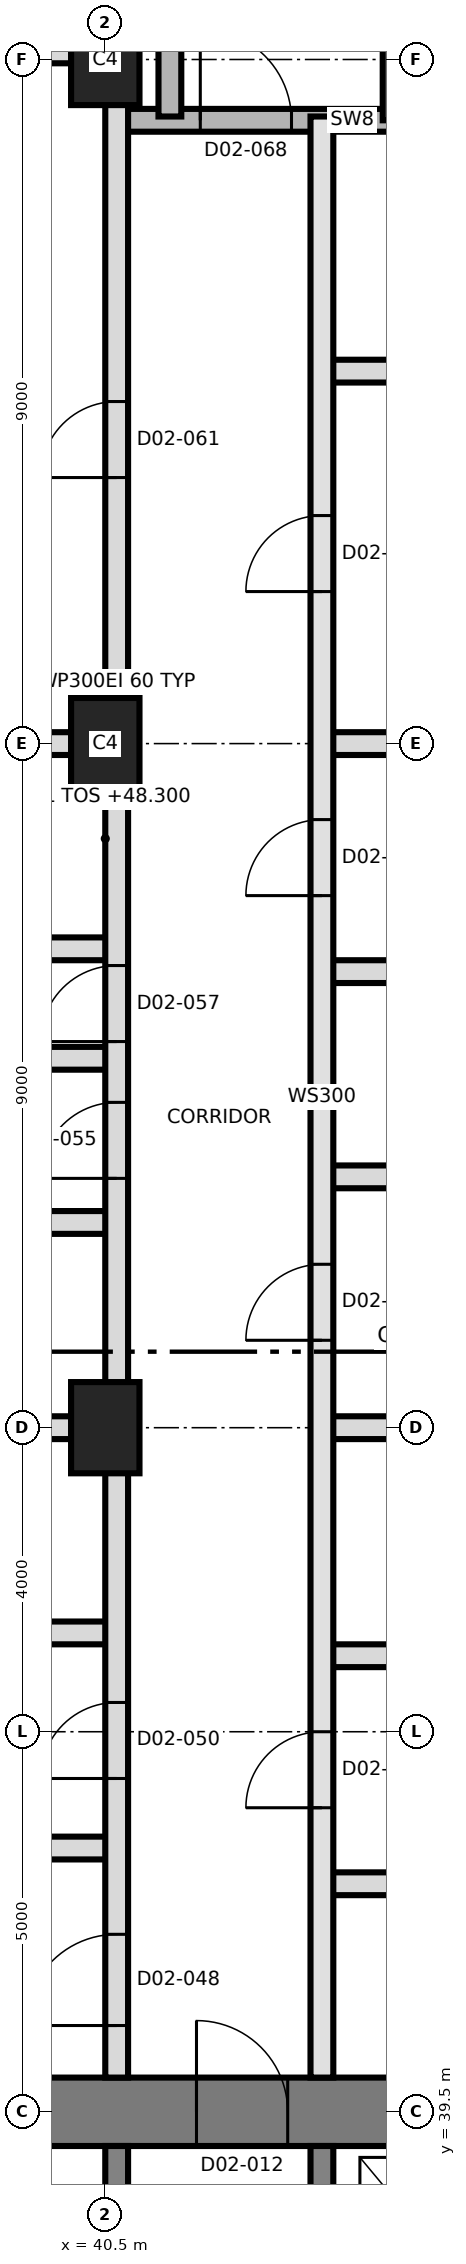
"""IFC4 building model, lengths in metres.
Left out: names, types, materials, properties, quantities, classifications, styles, units other than length and angle.
Written with IfcOpenShell. Run it as: python <this file> out.ifc"""

import sys

from ifc_helpers import new_model, si_unit, direction, frame, frame_2d, origin, origin_2d, place, context, subcontext, project, spatial, rectangle, extrude, element, fill, save


model = new_model("IFC4")
c1 = context("Model", 3, precision=1e-05, world=origin(), true_north=direction((0.0, 1.0)))
c2 = subcontext(c1, "Body", "Model", "MODEL_VIEW")
j1 = project(units=[si_unit("LENGTHUNIT", "METRE"), si_unit("PLANEANGLEUNIT", "RADIAN")], contexts=[c1])
p1 = place(None, origin())
s1 = spatial("IfcSite", under=j1, at=p1, CompositionType="ELEMENT")
p2 = place(p1, origin())
s2 = spatial("IfcBuilding", under=s1, at=p2, CompositionType="ELEMENT")
p3 = place(p2, frame((0.0, 0.0, 48.3)))
s3 = spatial("IfcBuildingStorey", under=s2, at=p3, CompositionType="ELEMENT", Elevation=48.3)
p4 = place(p3, frame((31.05, 39.5, 0.0), z_axis=(0.0, 0.0, 1.0), x_axis=(1.0, 0.0, 0.0)))
e1 = element("IfcWall", 1, at=p4, inside=s3, PredefinedType="SHEAR", context=c2, shape_type="SweptSolid", body=[
    extrude(rectangle(XDim=27.0, YDim=0.9, at=frame_2d((13.5, 0.0))), origin(), (0.0, 0.0, 1.0), 3.7),
])
p5 = place(p4, frame((10.65, 0.0, 0.0)))
e2 = element("IfcOpeningElement", 2, at=p5, cuts=e1, PredefinedType="OPENING", context=c2, shape_type="SweptSolid", body=[
    extrude(rectangle(XDim=1.2, YDim=2.1, at=frame_2d((0.6, 1.05))), frame((0.0, 0.46, 0.0), z_axis=(0.0, -1.0, 0.0), x_axis=(1.0, 0.0, 0.0)), (0.0, 0.0, 1.0), 0.92),
])
for number, where, z_axis, x_axis in (
    (3, (40.65, 33.5, 0.0), (0.0, 0.0, 1.0), (0.0, 1.0, 0.0)),
    (4, (43.35, 33.5, 0.0), (0.0, 0.0, 1.0), (0.0, 1.0, 0.0)),
):
    element("IfcWall", number, at=place(p3, frame(where, z_axis=z_axis, x_axis=x_axis)), inside=s3, PredefinedType="SHEAR", context=c2, shape_type="SweptSolid", body=[
        extrude(rectangle(XDim=5.55, YDim=0.3, at=frame_2d((2.775, 0.0))), origin(), (0.0, 0.0, 1.0), 3.7),
    ])
for number, where, z_axis, x_axis in (
    (5, (40.5, 48.5, 0.0), (0.0, 0.0, 1.0), (0.0, 1.0, 0.0)),
    (6, (40.5, 57.5, 0.0), (0.0, 0.0, 1.0), (0.0, 1.0, 0.0)),
    (7, (40.5, 66.5, 0.0), (0.0, 0.0, 1.0), (0.0, 1.0, 0.0)),
):
    element("IfcColumn", number, at=place(p3, frame(where, z_axis=z_axis, x_axis=x_axis)), inside=s3, PredefinedType="COLUMN", context=c2, shape_type="SweptSolid", body=[
        extrude(rectangle(XDim=1.2, YDim=0.9, at=origin_2d()), origin(), (0.0, 0.0, 1.0), 3.7),
    ])
p6 = place(p3, frame((43.35, 42.5, 0.0), z_axis=(0.0, 0.0, 1.0), x_axis=(1.0, 0.0, 0.0)))
e8 = element("IfcWall", 8, at=p6, inside=s3, PredefinedType="PARTITIONING", context=c2, shape_type="SweptSolid", body=[
    extrude(rectangle(XDim=3.3, YDim=0.3, at=frame_2d((1.65, 0.0))), origin(), (0.0, 0.0, 1.0), 3.4),
])
p7 = place(p3, frame((30.565, 42.97, 0.0), z_axis=(0.0, 0.0, 1.0), x_axis=(1.0, 0.0, 0.0)))
e9 = element("IfcWall", 9, at=p7, inside=s3, PredefinedType="PARTITIONING", context=c2, shape_type="SweptSolid", body=[
    extrude(rectangle(XDim=10.085, YDim=0.3, at=frame_2d((5.042, 0.0))), origin(), (0.0, 0.0, 1.0), 3.4),
])
p8 = place(p3, frame((43.35, 45.5, 0.0), z_axis=(0.0, 0.0, 1.0), x_axis=(1.0, 0.0, 0.0)))
e10 = element("IfcWall", 10, at=p8, inside=s3, PredefinedType="PARTITIONING", context=c2, shape_type="SweptSolid", body=[
    extrude(rectangle(XDim=3.3, YDim=0.3, at=frame_2d((1.65, 0.0))), origin(), (0.0, 0.0, 1.0), 3.4),
])
p9 = place(p3, frame((37.45, 45.8, 0.0), z_axis=(0.0, 0.0, 1.0), x_axis=(1.0, 0.0, 0.0)))
e11 = element("IfcWall", 11, at=p9, inside=s3, PredefinedType="PARTITIONING", context=c2, shape_type="SweptSolid", body=[
    extrude(rectangle(XDim=3.2, YDim=0.3, at=frame_2d((1.6, 0.0))), origin(), (0.0, 0.0, 1.0), 3.4),
])
p10 = place(p3, frame((30.565, 48.5, 0.0), z_axis=(0.0, 0.0, 1.0), x_axis=(1.0, 0.0, 0.0)))
e12 = element("IfcWall", 12, at=p10, inside=s3, PredefinedType="PARTITIONING", context=c2, shape_type="SweptSolid", body=[
    extrude(rectangle(XDim=10.085, YDim=0.3, at=frame_2d((5.042, 0.0))), origin(), (0.0, 0.0, 1.0), 3.4),
])
p11 = place(p3, frame((43.35, 48.5, 0.0), z_axis=(0.0, 0.0, 1.0), x_axis=(1.0, 0.0, 0.0)))
e13 = element("IfcWall", 13, at=p11, inside=s3, PredefinedType="PARTITIONING", context=c2, shape_type="SweptSolid", body=[
    extrude(rectangle(XDim=7.265, YDim=0.3, at=frame_2d((3.632, 0.0))), origin(), (0.0, 0.0, 1.0), 3.4),
])
for number, where, z_axis, x_axis in (
    (14, (37.45, 51.2, 0.0), (0.0, 0.0, 1.0), (1.0, 0.0, 0.0)),
    (15, (43.35, 51.8, 0.0), (0.0, 0.0, 1.0), (1.0, 0.0, 0.0)),
):
    element("IfcWall", number, at=place(p3, frame(where, z_axis=z_axis, x_axis=x_axis)), inside=s3, PredefinedType="PARTITIONING", context=c2, shape_type="SweptSolid", body=[
        extrude(rectangle(XDim=3.2, YDim=0.3, at=frame_2d((1.6, 0.0))), origin(), (0.0, 0.0, 1.0), 3.4),
    ])
p12 = place(p3, frame((30.565, 53.36, 0.0), z_axis=(0.0, 0.0, 1.0), x_axis=(1.0, 0.0, 0.0)))
e16 = element("IfcWall", 16, at=p12, inside=s3, PredefinedType="PARTITIONING", context=c2, shape_type="SweptSolid", body=[
    extrude(rectangle(XDim=10.085, YDim=0.3, at=frame_2d((5.042, 0.0))), origin(), (0.0, 0.0, 1.0), 3.4),
])
p13 = place(p3, frame((43.35, 54.5, 0.0), z_axis=(0.0, 0.0, 1.0), x_axis=(1.0, 0.0, 0.0)))
e17 = element("IfcWall", 17, at=p13, inside=s3, PredefinedType="PARTITIONING", context=c2, shape_type="SweptSolid", body=[
    extrude(rectangle(XDim=7.265, YDim=0.3, at=frame_2d((3.632, 0.0))), origin(), (0.0, 0.0, 1.0), 3.4),
])
p14 = place(p3, frame((37.45, 54.8, 0.0), z_axis=(0.0, 0.0, 1.0), x_axis=(1.0, 0.0, 0.0)))
e18 = element("IfcWall", 18, at=p14, inside=s3, PredefinedType="PARTITIONING", context=c2, shape_type="SweptSolid", body=[
    extrude(rectangle(XDim=3.2, YDim=0.3, at=frame_2d((1.6, 0.0))), origin(), (0.0, 0.0, 1.0), 3.4),
])
p15 = place(p3, frame((30.565, 57.5, 0.0), z_axis=(0.0, 0.0, 1.0), x_axis=(1.0, 0.0, 0.0)))
e19 = element("IfcWall", 19, at=p15, inside=s3, PredefinedType="PARTITIONING", context=c2, shape_type="SweptSolid", body=[
    extrude(rectangle(XDim=10.085, YDim=0.3, at=frame_2d((5.042, 0.0))), origin(), (0.0, 0.0, 1.0), 3.4),
])
p16 = place(p3, frame((43.35, 57.5, 0.0), z_axis=(0.0, 0.0, 1.0), x_axis=(1.0, 0.0, 0.0)))
e20 = element("IfcWall", 20, at=p16, inside=s3, PredefinedType="PARTITIONING", context=c2, shape_type="SweptSolid", body=[
    extrude(rectangle(XDim=7.265, YDim=0.3, at=frame_2d((3.632, 0.0))), origin(), (0.0, 0.0, 1.0), 3.4),
])
p17 = place(p3, frame((43.35, 62.4, 0.0), z_axis=(0.0, 0.0, 1.0), x_axis=(1.0, 0.0, 0.0)))
e21 = element("IfcWall", 21, at=p17, inside=s3, PredefinedType="PARTITIONING", context=c2, shape_type="SweptSolid", body=[
    extrude(rectangle(XDim=7.265, YDim=0.3, at=frame_2d((3.632, 0.0))), origin(), (0.0, 0.0, 1.0), 3.4),
])
p18 = place(p17, frame((4.65, 0.0, 0.0)))
e22 = element("IfcOpeningElement", 22, at=p18, cuts=e21, PredefinedType="OPENING", context=c2, shape_type="SweptSolid", body=[
    extrude(rectangle(XDim=1.0, YDim=2.1, at=frame_2d((0.5, 1.05))), frame((0.0, 0.16, 0.0), z_axis=(0.0, -1.0, 0.0), x_axis=(1.0, 0.0, 0.0)), (0.0, 0.0, 1.0), 0.32),
])
p19 = place(p3, frame((40.65, 65.7, 0.0), z_axis=(0.0, 0.0, 1.0), x_axis=(1.0, 0.0, 0.0)))
e23 = element("IfcWall", 23, at=p19, inside=s3, PredefinedType="SHEAR", context=c2, shape_type="SweptSolid", body=[
    extrude(rectangle(XDim=6.2, YDim=0.3, at=frame_2d((3.1, 0.0))), origin(), (0.0, 0.0, 1.0), 3.4),
])
p20 = place(p19, frame((1.1, 0.0, 0.0)))
e24 = element("IfcOpeningElement", 24, at=p20, cuts=e23, PredefinedType="OPENING", context=c2, shape_type="SweptSolid", body=[
    extrude(rectangle(XDim=1.2, YDim=2.1, at=frame_2d((0.6, 1.05))), frame((0.0, 0.16, 0.0), z_axis=(0.0, -1.0, 0.0), x_axis=(1.0, 0.0, 0.0)), (0.0, 0.0, 1.0), 0.32),
])
p21 = place(p3, frame((30.565, 66.6, 0.0), z_axis=(0.0, 0.0, 1.0), x_axis=(1.0, 0.0, 0.0)))
e25 = element("IfcWall", 25, at=p21, inside=s3, PredefinedType="PARTITIONING", context=c2, shape_type="SweptSolid", body=[
    extrude(rectangle(XDim=10.085, YDim=0.3, at=frame_2d((5.042, 0.0))), origin(), (0.0, 0.0, 1.0), 3.4),
])
p22 = place(p21, frame((4.435, 0.0, 0.0)))
e26 = element("IfcOpeningElement", 26, at=p22, cuts=e25, PredefinedType="OPENING", context=c2, shape_type="SweptSolid", body=[
    extrude(rectangle(XDim=1.0, YDim=2.1, at=frame_2d((0.5, 1.05))), frame((0.0, 0.16, 0.0), z_axis=(0.0, -1.0, 0.0), x_axis=(1.0, 0.0, 0.0)), (0.0, 0.0, 1.0), 0.32),
])
p23 = place(p3, frame((40.65, 39.95, 0.0), z_axis=(0.0, 0.0, 1.0), x_axis=(0.0, 1.0, 0.0)))
e27 = element("IfcWall", 27, at=p23, inside=s3, PredefinedType="PARTITIONING", context=c2, shape_type="SweptSolid", body=[
    extrude(rectangle(XDim=36.725, YDim=0.3, at=frame_2d((18.363, 0.0))), origin(), (0.0, 0.0, 1.0), 3.4),
])
p24 = place(p23, frame((0.685, 0.0, 0.0)))
e28 = element("IfcOpeningElement", 28, at=p24, cuts=e27, PredefinedType="OPENING", context=c2, shape_type="SweptSolid", body=[
    extrude(rectangle(XDim=1.2, YDim=2.1, at=frame_2d((0.6, 1.05))), frame((0.0, 0.16, 0.0), z_axis=(0.0, -1.0, 0.0), x_axis=(1.0, 0.0, 0.0)), (0.0, 0.0, 1.0), 0.32),
])
p25 = place(p23, frame((3.935, 0.0, 0.0)))
e29 = element("IfcOpeningElement", 29, at=p25, cuts=e27, PredefinedType="OPENING", context=c2, shape_type="SweptSolid", body=[
    extrude(rectangle(XDim=1.0, YDim=2.1, at=frame_2d((0.5, 1.05))), frame((0.0, 0.16, 0.0), z_axis=(0.0, -1.0, 0.0), x_axis=(1.0, 0.0, 0.0)), (0.0, 0.0, 1.0), 0.32),
])
p26 = place(p23, frame((11.83, 0.0, 0.0)))
e30 = element("IfcOpeningElement", 30, at=p26, cuts=e27, PredefinedType="OPENING", context=c2, shape_type="SweptSolid", body=[
    extrude(rectangle(XDim=1.0, YDim=2.1, at=frame_2d((0.5, 1.05))), frame((0.0, 0.16, 0.0), z_axis=(0.0, -1.0, 0.0), x_axis=(1.0, 0.0, 0.0)), (0.0, 0.0, 1.0), 0.32),
])
p27 = place(p23, frame((13.63, 0.0, 0.0)))
e31 = element("IfcOpeningElement", 31, at=p27, cuts=e27, PredefinedType="OPENING", context=c2, shape_type="SweptSolid", body=[
    extrude(rectangle(XDim=1.0, YDim=2.1, at=frame_2d((0.5, 1.05))), frame((0.0, 0.16, 0.0), z_axis=(0.0, -1.0, 0.0), x_axis=(1.0, 0.0, 0.0)), (0.0, 0.0, 1.0), 0.32),
])
p28 = place(p23, frame((21.05, 0.0, 0.0)))
e32 = element("IfcOpeningElement", 32, at=p28, cuts=e27, PredefinedType="OPENING", context=c2, shape_type="SweptSolid", body=[
    extrude(rectangle(XDim=1.0, YDim=2.4, at=frame_2d((0.5, 1.2))), frame((0.0, 0.16, 0.0), z_axis=(0.0, -1.0, 0.0), x_axis=(1.0, 0.0, 0.0)), (0.0, 0.0, 1.0), 0.32),
])
p29 = place(p3, frame((41.35, 65.75, 0.0), z_axis=(0.0, 0.0, 1.0), x_axis=(0.0, 1.0, 0.0)))
e33 = element("IfcWall", 33, at=p29, inside=s3, PredefinedType="SHEAR", context=c2, shape_type="SweptSolid", body=[
    extrude(rectangle(XDim=8.85, YDim=0.3, at=frame_2d((4.425, 0.0))), origin(), (0.0, 0.0, 1.0), 3.4),
])
p30 = place(p3, frame((43.35, 39.95, 0.0), z_axis=(0.0, 0.0, 1.0), x_axis=(0.0, 1.0, 0.0)))
e34 = element("IfcWall", 34, at=p30, inside=s3, PredefinedType="SOLIDWALL", context=c2, shape_type="SweptSolid", body=[
    extrude(rectangle(XDim=25.8, YDim=0.3, at=frame_2d((12.9, 0.0))), origin(), (0.0, 0.0, 1.0), 3.4),
])
p31 = place(p30, frame((3.55, 0.0, 0.0)))
e35 = element("IfcOpeningElement", 35, at=p31, cuts=e34, PredefinedType="OPENING", context=c2, shape_type="SweptSolid", body=[
    extrude(rectangle(XDim=1.0, YDim=2.4, at=frame_2d((0.5, 1.2))), frame((0.0, 0.16, 0.0), z_axis=(0.0, -1.0, 0.0), x_axis=(1.0, 0.0, 0.0)), (0.0, 0.0, 1.0), 0.32),
])
p32 = place(p30, frame((9.7, 0.0, 0.0)))
e36 = element("IfcOpeningElement", 36, at=p32, cuts=e34, PredefinedType="OPENING", context=c2, shape_type="SweptSolid", body=[
    extrude(rectangle(XDim=1.0, YDim=2.1, at=frame_2d((0.5, 1.05))), frame((0.0, 0.16, 0.0), z_axis=(0.0, -1.0, 0.0), x_axis=(1.0, 0.0, 0.0)), (0.0, 0.0, 1.0), 0.32),
])
p33 = place(p30, frame((15.55, 0.0, 0.0)))
e37 = element("IfcOpeningElement", 37, at=p33, cuts=e34, PredefinedType="OPENING", context=c2, shape_type="SweptSolid", body=[
    extrude(rectangle(XDim=1.0, YDim=2.1, at=frame_2d((0.5, 1.05))), frame((0.0, 0.16, 0.0), z_axis=(0.0, -1.0, 0.0), x_axis=(1.0, 0.0, 0.0)), (0.0, 0.0, 1.0), 0.32),
])
p34 = place(p30, frame((19.55, 0.0, 0.0)))
e38 = element("IfcOpeningElement", 38, at=p34, cuts=e34, PredefinedType="OPENING", context=c2, shape_type="SweptSolid", body=[
    extrude(rectangle(XDim=1.0, YDim=2.4, at=frame_2d((0.5, 1.2))), frame((0.0, 0.16, 0.0), z_axis=(0.0, -1.0, 0.0), x_axis=(1.0, 0.0, 0.0)), (0.0, 0.0, 1.0), 0.32),
])
p35 = place(p3, frame((44.3, 65.7, 0.0), z_axis=(0.0, 0.0, 1.0), x_axis=(0.0, 1.0, 0.0)))
e39 = element("IfcWall", 39, at=p35, inside=s3, PredefinedType="SHEAR", context=c2, shape_type="SweptSolid", body=[
    extrude(rectangle(XDim=8.9, YDim=0.3, at=frame_2d((4.45, 0.0))), origin(), (0.0, 0.0, 1.0), 3.4),
])
p36 = place(p5, origin())
e40 = element("IfcDoor", 40, at=p36, inside=s3, OperationType="SINGLE_SWING_RIGHT", PredefinedType="DOOR", context=c2, shape_type="SweptSolid", body=[
    extrude(rectangle(XDim=1.2, YDim=2.1, at=frame_2d((0.6, 1.05))), frame((0.0, 0.025, 0.0), z_axis=(0.0, -1.0, 0.0), x_axis=(1.0, 0.0, 0.0)), (0.0, 0.0, 1.0), 0.05),
])
fill(e2, e40)
p37 = place(p31, origin())
e41 = element("IfcDoor", 41, at=p37, inside=s3, OperationType="SINGLE_SWING_LEFT", PredefinedType="DOOR", context=c2, shape_type="SweptSolid", body=[
    extrude(rectangle(XDim=1.0, YDim=2.4, at=frame_2d((0.5, 1.2))), frame((0.0, 0.025, 0.0), z_axis=(0.0, -1.0, 0.0), x_axis=(1.0, 0.0, 0.0)), (0.0, 0.0, 1.0), 0.05),
])
fill(e35, e41)
p38 = place(p24, origin())
e42 = element("IfcDoor", 42, at=p38, inside=s3, OperationType="SINGLE_SWING_LEFT", PredefinedType="DOOR", context=c2, shape_type="SweptSolid", body=[
    extrude(rectangle(XDim=1.2, YDim=2.1, at=frame_2d((0.6, 1.05))), frame((0.0, 0.025, 0.0), z_axis=(0.0, -1.0, 0.0), x_axis=(1.0, 0.0, 0.0)), (0.0, 0.0, 1.0), 0.05),
])
fill(e28, e42)
p39 = place(p25, origin())
e43 = element("IfcDoor", 43, at=p39, inside=s3, OperationType="SINGLE_SWING_RIGHT", PredefinedType="DOOR", context=c2, shape_type="SweptSolid", body=[
    extrude(rectangle(XDim=1.0, YDim=2.1, at=frame_2d((0.5, 1.05))), frame((0.0, 0.025, 0.0), z_axis=(0.0, -1.0, 0.0), x_axis=(1.0, 0.0, 0.0)), (0.0, 0.0, 1.0), 0.05),
])
fill(e29, e43)
p40 = place(p32, origin())
e44 = element("IfcDoor", 44, at=p40, inside=s3, OperationType="SINGLE_SWING_LEFT", PredefinedType="DOOR", context=c2, shape_type="SweptSolid", body=[
    extrude(rectangle(XDim=1.0, YDim=2.1, at=frame_2d((0.5, 1.05))), frame((0.0, 0.025, 0.0), z_axis=(0.0, -1.0, 0.0), x_axis=(1.0, 0.0, 0.0)), (0.0, 0.0, 1.0), 0.05),
])
fill(e36, e44)
p41 = place(p33, origin())
e45 = element("IfcDoor", 45, at=p41, inside=s3, OperationType="SINGLE_SWING_LEFT", PredefinedType="DOOR", context=c2, shape_type="SweptSolid", body=[
    extrude(rectangle(XDim=1.0, YDim=2.1, at=frame_2d((0.5, 1.05))), frame((0.0, 0.025, 0.0), z_axis=(0.0, -1.0, 0.0), x_axis=(1.0, 0.0, 0.0)), (0.0, 0.0, 1.0), 0.05),
])
fill(e37, e45)
p42 = place(p26, origin())
e46 = element("IfcDoor", 46, at=p42, inside=s3, OperationType="SINGLE_SWING_LEFT", PredefinedType="DOOR", context=c2, shape_type="SweptSolid", body=[
    extrude(rectangle(XDim=1.0, YDim=2.1, at=frame_2d((0.5, 1.05))), frame((0.0, 0.025, 0.0), z_axis=(0.0, -1.0, 0.0), x_axis=(1.0, 0.0, 0.0)), (0.0, 0.0, 1.0), 0.05),
])
fill(e30, e46)
p43 = place(p27, origin())
e47 = element("IfcDoor", 47, at=p43, inside=s3, OperationType="SINGLE_SWING_LEFT", PredefinedType="DOOR", context=c2, shape_type="SweptSolid", body=[
    extrude(rectangle(XDim=1.0, YDim=2.1, at=frame_2d((0.5, 1.05))), frame((0.0, 0.025, 0.0), z_axis=(0.0, -1.0, 0.0), x_axis=(1.0, 0.0, 0.0)), (0.0, 0.0, 1.0), 0.05),
])
fill(e31, e47)
p44 = place(p34, origin())
e48 = element("IfcDoor", 48, at=p44, inside=s3, OperationType="SINGLE_SWING_RIGHT", PredefinedType="DOOR", context=c2, shape_type="SweptSolid", body=[
    extrude(rectangle(XDim=1.0, YDim=2.4, at=frame_2d((0.5, 1.2))), frame((0.0, 0.025, 0.0), z_axis=(0.0, -1.0, 0.0), x_axis=(1.0, 0.0, 0.0)), (0.0, 0.0, 1.0), 0.05),
])
fill(e38, e48)
p45 = place(p28, origin())
e49 = element("IfcDoor", 49, at=p45, inside=s3, OperationType="SINGLE_SWING_RIGHT", PredefinedType="DOOR", context=c2, shape_type="SweptSolid", body=[
    extrude(rectangle(XDim=1.0, YDim=2.4, at=frame_2d((0.5, 1.2))), frame((0.0, 0.025, 0.0), z_axis=(0.0, -1.0, 0.0), x_axis=(1.0, 0.0, 0.0)), (0.0, 0.0, 1.0), 0.05),
])
fill(e32, e49)
p46 = place(p20, origin())
e50 = element("IfcDoor", 50, at=p46, inside=s3, OperationType="SINGLE_SWING_RIGHT", PredefinedType="DOOR", context=c2, shape_type="SweptSolid", body=[
    extrude(rectangle(XDim=1.2, YDim=2.1, at=frame_2d((0.6, 1.05))), frame((0.0, 0.025, 0.0), z_axis=(0.0, -1.0, 0.0), x_axis=(1.0, 0.0, 0.0)), (0.0, 0.0, 1.0), 0.05),
])
fill(e24, e50)
save(model, sys.argv[1])
